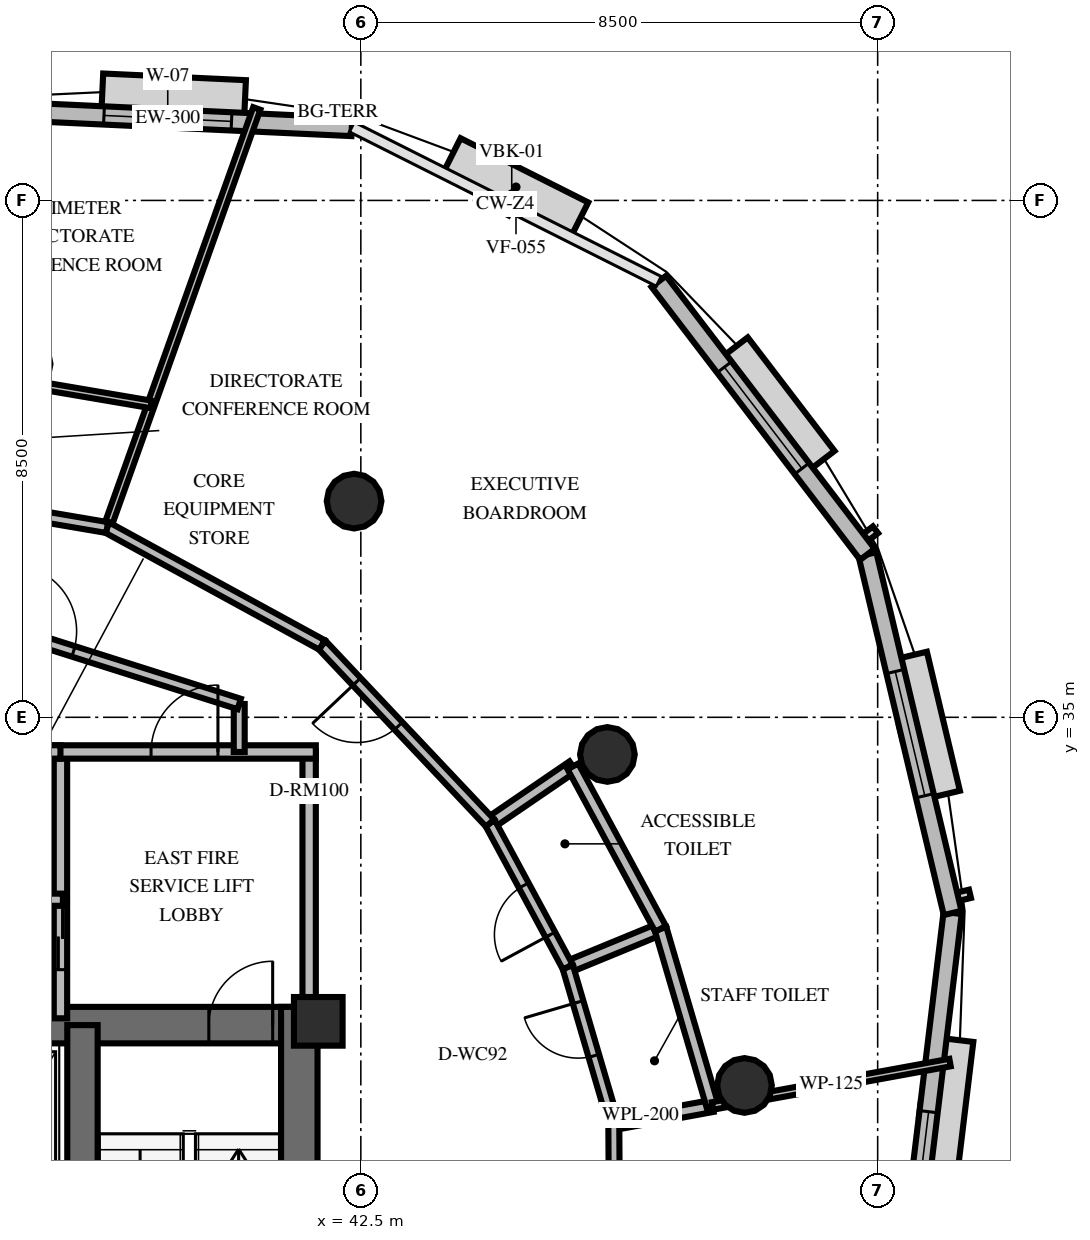
"""IFC4 building model, lengths in metres.
Left out: names, types, materials, properties, quantities, classifications, styles, units other than length and angle.
Written with IfcOpenShell. Run it as: python <this file> out.ifc"""

import sys

from ifc_helpers import new_model, si_unit, direction, frame, frame_2d, origin, origin_2d, place, context, subcontext, project, spatial, rectangle, circle, extrude, element, fill, save


model = new_model("IFC4")
c1 = context("Model", 3, precision=1e-05, world=origin(), true_north=direction((0.0, 1.0)))
c2 = subcontext(c1, "Body", "Model", "MODEL_VIEW")
j1 = project(units=[si_unit("LENGTHUNIT", "METRE"), si_unit("PLANEANGLEUNIT", "RADIAN")], contexts=[c1])
p1 = place(None, origin())
s1 = spatial("IfcSite", under=j1, at=p1, CompositionType="ELEMENT")
p2 = place(p1, origin())
s2 = spatial("IfcBuilding", under=s1, at=p2, CompositionType="ELEMENT")
p3 = place(p2, frame((0.0, 0.0, 241.2)))
s3 = spatial("IfcBuildingStorey", under=s2, at=p3, CompositionType="ELEMENT", Elevation=241.2)
p4 = place(p3, frame((26.222, 29.938, 0.0), z_axis=(0.0, 0.0, 1.0), x_axis=(1.0, 0.0, 0.0)))
e1 = element("IfcWall", 1, at=p4, inside=s3, PredefinedType="SHEAR", context=c2, shape_type="SweptSolid", body=[
    extrude(rectangle(XDim=15.566, YDim=0.6, at=frame_2d((7.783, 0.0))), origin(), (0.0, 0.0, 1.0), 3.6),
])
p5 = place(p4, frame((0.728, 0.0, 0.0)))
e2 = element("IfcOpeningElement", 2, at=p5, cuts=e1, PredefinedType="OPENING", context=c2, shape_type="SweptSolid", body=[
    extrude(rectangle(XDim=1.05, YDim=2.15, at=frame_2d((0.525, 1.075))), frame((0.0, 0.31, 0.0), z_axis=(0.0, -1.0, 0.0), x_axis=(1.0, 0.0, 0.0)), (0.0, 0.0, 1.0), 0.62),
])
p6 = place(p4, frame((13.778, 0.0, 0.0)))
e3 = element("IfcOpeningElement", 3, at=p6, cuts=e1, PredefinedType="OPENING", context=c2, shape_type="SweptSolid", body=[
    extrude(rectangle(XDim=1.05, YDim=2.15, at=frame_2d((0.525, 1.075))), frame((0.0, 0.31, 0.0), z_axis=(0.0, -1.0, 0.0), x_axis=(1.0, 0.0, 0.0)), (0.0, 0.0, 1.0), 0.62),
])
p7 = place(p4, frame((7.228, 0.0, 0.0)))
e4 = element("IfcOpeningElement", 4, at=p7, cuts=e1, PredefinedType="OPENING", context=c2, shape_type="SweptSolid", body=[
    extrude(rectangle(XDim=1.1, YDim=2.15, at=frame_2d((0.55, 1.075))), frame((0.0, 0.31, 0.0), z_axis=(0.0, -1.0, 0.0), x_axis=(1.0, 0.0, 0.0)), (0.0, 0.0, 1.0), 0.62),
])
p8 = place(p3, frame((41.488, 19.962, 0.0), z_axis=(0.0, 0.0, 1.0), x_axis=(0.0, 1.0, 0.0)))
e5 = element("IfcWall", 5, at=p8, inside=s3, PredefinedType="SHEAR", context=c2, shape_type="SweptSolid", body=[
    extrude(rectangle(XDim=10.276, YDim=0.6, at=frame_2d((5.138, 0.0))), origin(), (0.0, 0.0, 1.0), 3.6),
])
p9 = place(p3, frame((37.922, 20.262, 0.0), z_axis=(0.0, 0.0, 1.0), x_axis=(0.0, 1.0, 0.0)))
e6 = element("IfcWall", 6, at=p9, inside=s3, PredefinedType="SHEAR", context=c2, shape_type="SweptSolid", body=[
    extrude(rectangle(XDim=9.676, YDim=0.5, at=frame_2d((4.838, 0.0))), origin(), (0.0, 0.0, 1.0), 3.6),
])
p10 = place(p3, frame((41.8, 30.0, 0.0), z_axis=(0.0, 0.0, 1.0), x_axis=(1.0, 0.0, 0.0)))
e7 = element("IfcColumn", 7, at=p10, inside=s3, PredefinedType="PILASTER", context=c2, shape_type="SweptSolid", body=[
    extrude(rectangle(XDim=0.8, YDim=0.8, at=origin_2d()), origin(), (0.0, 0.0, 1.0), 3.6),
])
for number, where, z_axis, x_axis in (
    (8, (48.81, 28.946, 0.0), (0.0, 0.0, 1.0), (1.0, 0.0, 0.0)),
    (9, (46.555, 34.389, 0.0), (0.0, 0.0, 1.0), (1.0, 0.0, 0.0)),
    (10, (42.389, 38.555, 0.0), (0.0, 0.0, 1.0), (1.0, 0.0, 0.0)),
):
    element("IfcColumn", number, at=place(p3, frame(where, z_axis=z_axis, x_axis=x_axis)), inside=s3, PredefinedType="COLUMN", context=c2, shape_type="SweptSolid", body=[
        extrude(circle(Radius=0.45, at=origin_2d()), origin(), (0.0, 0.0, 1.0), 3.6),
    ])
p11 = place(p3, frame((42.352, 44.708, 0.0), z_axis=(0.0, 0.0, 1.0), x_axis=(-0.998917432733, 0.046518411209, 0.0)))
e11 = element("IfcWall", 11, at=p11, inside=s3, PredefinedType="SOLIDWALL", context=c2, shape_type="SweptSolid", body=[
    extrude(rectangle(XDim=6.062, YDim=0.3, at=frame_2d((3.031, 0.0))), origin(), (0.0, 0.0, 1.0), 2.76),
])
p12 = place(p11, frame((1.981, 0.0, 0.8)))
e12 = element("IfcOpeningElement", 12, at=p12, cuts=e11, PredefinedType="OPENING", context=c2, shape_type="SweptSolid", body=[
    extrude(rectangle(XDim=2.1, YDim=1.85, at=frame_2d((1.05, 0.925))), frame((0.0, 0.16, 0.0), z_axis=(0.0, -1.0, 0.0), x_axis=(1.0, 0.0, 0.0)), (0.0, 0.0, 1.0), 0.32),
])
p13 = place(p3, frame((51.436, 25.188, 0.0), z_axis=(0.0, 0.0, 1.0), x_axis=(0.120062472336, 0.992766338439, 0.0)))
e13 = element("IfcWall", 13, at=p13, inside=s3, PredefinedType="SOLIDWALL", context=c2, shape_type="SweptSolid", body=[
    extrude(rectangle(XDim=6.643, YDim=0.3, at=frame_2d((3.322, 0.0))), origin(), (0.0, 0.0, 1.0), 2.76),
])
p14 = place(p13, frame((1.251, 0.0, 0.8)))
e14 = element("IfcOpeningElement", 14, at=p14, cuts=e13, PredefinedType="OPENING", context=c2, shape_type="SweptSolid", body=[
    extrude(rectangle(XDim=2.1, YDim=1.85, at=frame_2d((1.05, 0.925))), frame((0.0, 0.16, 0.0), z_axis=(0.0, -1.0, 0.0), x_axis=(1.0, 0.0, 0.0)), (0.0, 0.0, 1.0), 0.32),
])
p15 = place(p3, frame((52.233, 31.783, 0.0), z_axis=(0.0, 0.0, 1.0), x_axis=(-0.23117584111, 0.972911984964, 0.0)))
e15 = element("IfcWall", 15, at=p15, inside=s3, PredefinedType="SOLIDWALL", context=c2, shape_type="SweptSolid", body=[
    extrude(rectangle(XDim=6.062, YDim=0.3, at=frame_2d((3.031, 0.0))), origin(), (0.0, 0.0, 1.0), 2.76),
])
p16 = place(p15, frame((1.981, 0.0, 0.8)))
e16 = element("IfcOpeningElement", 16, at=p16, cuts=e15, PredefinedType="OPENING", context=c2, shape_type="SweptSolid", body=[
    extrude(rectangle(XDim=2.1, YDim=1.85, at=frame_2d((1.05, 0.925))), frame((0.0, 0.16, 0.0), z_axis=(0.0, -1.0, 0.0), x_axis=(1.0, 0.0, 0.0)), (0.0, 0.0, 1.0), 0.32),
])
p17 = place(p3, frame((50.832, 37.68, 0.0), z_axis=(0.0, 0.0, 1.0), x_axis=(-0.607371519301, 0.794417923729, 0.0)))
e17 = element("IfcWall", 17, at=p17, inside=s3, PredefinedType="SOLIDWALL", context=c2, shape_type="SweptSolid", body=[
    extrude(rectangle(XDim=5.65, YDim=0.3, at=frame_2d((2.825, 0.0))), origin(), (0.0, 0.0, 1.0), 2.76),
])
p18 = place(p17, frame((1.775, 0.0, 0.8)))
e18 = element("IfcOpeningElement", 18, at=p18, cuts=e17, PredefinedType="OPENING", context=c2, shape_type="SweptSolid", body=[
    extrude(rectangle(XDim=2.1, YDim=1.85, at=frame_2d((1.05, 0.925))), frame((0.0, 0.16, 0.0), z_axis=(0.0, -1.0, 0.0), x_axis=(1.0, 0.0, 0.0)), (0.0, 0.0, 1.0), 0.32),
])
p19 = place(p3, frame((37.56, 30.05, 0.0), z_axis=(0.0, 0.0, 1.0), x_axis=(0.0, 1.0, 0.0)))
e19 = element("IfcWall", 19, at=p19, inside=s3, PredefinedType="SOLIDWALL", context=c2, shape_type="SweptSolid", body=[
    extrude(rectangle(XDim=4.38, YDim=0.22, at=frame_2d((2.19, 0.0))), origin(), (0.0, 0.0, 1.0), 2.46),
])
p20 = place(p19, frame((0.8, 0.0, 0.0)))
e20 = element("IfcOpeningElement", 20, at=p20, cuts=e19, PredefinedType="OPENING", context=c2, shape_type="SweptSolid", body=[
    extrude(rectangle(XDim=1.05, YDim=2.1, at=frame_2d((0.525, 1.05))), frame((0.0, 0.12, 0.0), z_axis=(0.0, -1.0, 0.0), x_axis=(1.0, 0.0, 0.0)), (0.0, 0.0, 1.0), 0.24),
])
p21 = place(p3, frame((41.65, 30.05, 0.0), z_axis=(0.0, 0.0, 1.0), x_axis=(0.0, 1.0, 0.0)))
e21 = element("IfcWall", 21, at=p21, inside=s3, PredefinedType="SOLIDWALL", context=c2, shape_type="SweptSolid", body=[
    extrude(rectangle(XDim=4.38, YDim=0.22, at=frame_2d((2.19, 0.0))), origin(), (0.0, 0.0, 1.0), 2.46),
])
p22 = place(p3, frame((37.45, 34.43, 0.0), z_axis=(0.0, 0.0, 1.0), x_axis=(1.0, 0.0, 0.0)))
e22 = element("IfcWall", 22, at=p22, inside=s3, PredefinedType="SOLIDWALL", context=c2, shape_type="SweptSolid", body=[
    extrude(rectangle(XDim=4.31, YDim=0.22, at=frame_2d((2.155, 0.0))), origin(), (0.0, 0.0, 1.0), 2.46),
])
p23 = place(p22, frame((1.6, 0.0, 0.0)))
e23 = element("IfcOpeningElement", 23, at=p23, cuts=e22, PredefinedType="OPENING", context=c2, shape_type="SweptSolid", body=[
    extrude(rectangle(XDim=1.1, YDim=2.15, at=frame_2d((0.55, 1.075))), frame((0.0, 0.12, 0.0), z_axis=(0.0, -1.0, 0.0), x_axis=(1.0, 0.0, 0.0)), (0.0, 0.0, 1.0), 0.24),
])
p24 = place(p3, frame((35.05, 32.0, 0.0), z_axis=(0.0, 0.0, 1.0), x_axis=(1.0, 0.0, 0.0)))
e24 = element("IfcWall", 24, at=p24, inside=s3, PredefinedType="SOLIDWALL", context=c2, shape_type="SweptSolid", body=[
    extrude(rectangle(XDim=2.55, YDim=0.2, at=frame_2d((1.275, 0.0))), origin(), (0.0, 0.0, 1.0), 2.46),
])
p25 = place(p3, frame((30.44, 34.43, 0.0), z_axis=(0.0, 0.0, 1.0), x_axis=(1.0, 0.0, 0.0)))
e25 = element("IfcWall", 25, at=p25, inside=s3, PredefinedType="SOLIDWALL", context=c2, shape_type="SweptSolid", body=[
    extrude(rectangle(XDim=7.12, YDim=0.22, at=frame_2d((3.56, 0.0))), origin(), (0.0, 0.0, 1.0), 2.46),
])
p26 = place(p25, frame((3.01, 0.0, 0.0)))
e26 = element("IfcOpeningElement", 26, at=p26, cuts=e25, PredefinedType="OPENING", context=c2, shape_type="SweptSolid", body=[
    extrude(rectangle(XDim=1.1, YDim=2.15, at=frame_2d((0.55, 1.075))), frame((0.0, 0.12, 0.0), z_axis=(0.0, -1.0, 0.0), x_axis=(1.0, 0.0, 0.0)), (0.0, 0.0, 1.0), 0.24),
])
p27 = place(p3, frame((40.5, 35.219, 0.0), z_axis=(0.0, 0.0, 1.0), x_axis=(0.0, -1.0, 0.0)))
e27 = element("IfcWall", 27, at=p27, inside=s3, PredefinedType="PARTITIONING", context=c2, shape_type="SweptSolid", body=[
    extrude(rectangle(XDim=0.789, YDim=0.18, at=frame_2d((0.395, 0.0))), origin(), (0.0, 0.0, 1.0), 2.46),
])
p28 = place(p3, frame((34.0, 37.28, 0.0), z_axis=(0.0, 0.0, 1.0), x_axis=(0.953228121756, -0.302251795518, 0.0)))
e28 = element("IfcWall", 28, at=p28, inside=s3, PredefinedType="PARTITIONING", context=c2, shape_type="SweptSolid", body=[
    extrude(rectangle(XDim=6.819, YDim=0.18, at=frame_2d((3.409, 0.0))), origin(), (0.0, 0.0, 1.0), 2.46),
])
p29 = place(p28, frame((2.86, 0.0, 0.0)))
e29 = element("IfcOpeningElement", 29, at=p29, cuts=e28, PredefinedType="OPENING", context=c2, shape_type="SweptSolid", body=[
    extrude(rectangle(XDim=1.1, YDim=2.15, at=frame_2d((0.55, 1.075))), frame((0.0, 0.1, 0.0), z_axis=(0.0, -1.0, 0.0), x_axis=(1.0, 0.0, 0.0)), (0.0, 0.0, 1.0), 0.2),
])
for number, where, z_axis, x_axis in (
    (30, (46.661, 28.312, 0.0), (0.0, 0.0, 1.0), (0.984, 0.18, 0.0)),
    (31, (45.903, 30.894, 0.0), (0.0, 0.0, 1.0), (0.925, 0.38, 0.0)),
):
    element("IfcWall", number, at=place(p3, frame(where, z_axis=z_axis, x_axis=x_axis)), inside=s3, PredefinedType="PLUMBINGWALL", context=c2, shape_type="SweptSolid", body=[
        extrude(rectangle(XDim=1.65, YDim=0.2, at=frame_2d((0.825, 0.0))), origin(), (0.0, 0.0, 1.0), 2.46),
    ])
p30 = place(p3, frame((48.284, 28.609, 0.0), z_axis=(0.0, 0.0, 1.0), x_axis=(-0.281491340898, 0.959563768073, 0.0)))
e32 = element("IfcWall", 32, at=p30, inside=s3, PredefinedType="PLUMBINGWALL", context=c2, shape_type="SweptSolid", body=[
    extrude(rectangle(XDim=3.036, YDim=0.2, at=frame_2d((1.518, 0.0))), origin(), (0.0, 0.0, 1.0), 2.46),
])
p31 = place(p3, frame((46.661, 28.312, 0.0), z_axis=(0.0, 0.0, 1.0), x_axis=(-0.281473567951, 0.95956898165, 0.0)))
e33 = element("IfcWall", 33, at=p31, inside=s3, PredefinedType="PARTITIONING", context=c2, shape_type="SweptSolid", body=[
    extrude(rectangle(XDim=2.691, YDim=0.18, at=frame_2d((1.345, 0.0))), origin(), (0.0, 0.0, 1.0), 2.46),
])
p32 = place(p31, frame((1.167, 0.0, 0.0)))
e34 = element("IfcOpeningElement", 34, at=p32, cuts=e33, PredefinedType="OPENING", context=c2, shape_type="SweptSolid", body=[
    extrude(rectangle(XDim=0.92, YDim=2.1, at=frame_2d((0.46, 1.05))), frame((0.0, 0.1, 0.0), z_axis=(0.0, -1.0, 0.0), x_axis=(1.0, 0.0, 0.0)), (0.0, 0.0, 1.0), 0.2),
])
p33 = place(p3, frame((44.625, 33.262, 0.0), z_axis=(0.0, 0.0, 1.0), x_axis=(0.825644641501, 0.564190505026, 0.0)))
e35 = element("IfcWall", 35, at=p33, inside=s3, PredefinedType="PLUMBINGWALL", context=c2, shape_type="SweptSolid", body=[
    extrude(rectangle(XDim=1.65, YDim=0.2, at=frame_2d((0.825, 0.0))), origin(), (0.0, 0.0, 1.0), 2.46),
])
p34 = place(p3, frame((47.429, 31.521, 0.0), z_axis=(0.0, 0.0, 1.0), x_axis=(-0.474857458355, 0.880062721768, 0.0)))
e36 = element("IfcWall", 36, at=p34, inside=s3, PredefinedType="PLUMBINGWALL", context=c2, shape_type="SweptSolid", body=[
    extrude(rectangle(XDim=3.035, YDim=0.2, at=frame_2d((1.518, 0.0))), origin(), (0.0, 0.0, 1.0), 2.46),
])
p35 = place(p3, frame((45.903, 30.894, 0.0), z_axis=(0.0, 0.0, 1.0), x_axis=(-0.474905831931, 0.88003661901, 0.0)))
e37 = element("IfcWall", 37, at=p35, inside=s3, PredefinedType="PARTITIONING", context=c2, shape_type="SweptSolid", body=[
    extrude(rectangle(XDim=2.691, YDim=0.18, at=frame_2d((1.345, 0.0))), origin(), (0.0, 0.0, 1.0), 2.46),
])
p36 = place(p35, frame((0.603, 0.0, 0.0)))
e38 = element("IfcOpeningElement", 38, at=p36, cuts=e37, PredefinedType="OPENING", context=c2, shape_type="SweptSolid", body=[
    extrude(rectangle(XDim=0.92, YDim=2.1, at=frame_2d((0.46, 1.05))), frame((0.0, 0.1, 0.0), z_axis=(0.0, -1.0, 0.0), x_axis=(1.0, 0.0, 0.0)), (0.0, 0.0, 1.0), 0.2),
])
p37 = place(p3, frame((48.284, 28.609, 0.0), z_axis=(0.0, 0.0, 1.0), x_axis=(0.98373190469, 0.179642811418, 0.0)))
e39 = element("IfcWall", 39, at=p37, inside=s3, PredefinedType="PARTITIONING", context=c2, shape_type="SweptSolid", body=[
    extrude(rectangle(XDim=3.971, YDim=0.125, at=frame_2d((1.986, 0.0))), origin(), (0.0, 0.0, 1.0), 2.46),
])
p38 = place(p3, frame((38.328, 38.121, 0.0), z_axis=(0.0, 0.0, 1.0), x_axis=(0.33628356157, 0.941760779719, 0.0)))
e40 = element("IfcWall", 40, at=p38, inside=s3, PredefinedType="PARTITIONING", context=c2, shape_type="SweptSolid", body=[
    extrude(rectangle(XDim=7.318, YDim=0.125, at=frame_2d((3.659, 0.0))), origin(), (0.0, 0.0, 1.0), 2.46),
])
p39 = place(p3, frame((44.625, 33.262, 0.0), z_axis=(0.0, 0.0, 1.0), x_axis=(-0.686440124719, 0.727186327688, 0.0)))
e41 = element("IfcWall", 41, at=p39, inside=s3, PredefinedType="PARTITIONING", context=c2, shape_type="SweptSolid", body=[
    extrude(rectangle(XDim=4.026, YDim=0.18, at=frame_2d((2.013, 0.0))), origin(), (0.0, 0.0, 1.0), 2.46),
])
p40 = place(p39, frame((2.195, 0.0, 0.0)))
e42 = element("IfcOpeningElement", 42, at=p40, cuts=e41, PredefinedType="OPENING", context=c2, shape_type="SweptSolid", body=[
    extrude(rectangle(XDim=1.0, YDim=2.15, at=frame_2d((0.5, 1.075))), frame((0.0, 0.1, 0.0), z_axis=(0.0, -1.0, 0.0), x_axis=(1.0, 0.0, 0.0)), (0.0, 0.0, 1.0), 0.2),
])
p41 = place(p3, frame((41.862, 36.19, 0.0), z_axis=(0.0, 0.0, 1.0), x_axis=(-0.877561700538, 0.47946372308, 0.0)))
e43 = element("IfcWall", 43, at=p41, inside=s3, PredefinedType="PARTITIONING", context=c2, shape_type="SweptSolid", body=[
    extrude(rectangle(XDim=4.027, YDim=0.18, at=frame_2d((2.013, 0.0))), origin(), (0.0, 0.0, 1.0), 2.46),
])
p42 = place(p3, frame((38.328, 38.121, 0.0), z_axis=(0.0, 0.0, 1.0), x_axis=(-0.985849799471, 0.167631061808, 0.0)))
e44 = element("IfcWall", 44, at=p42, inside=s3, PredefinedType="PARTITIONING", context=c2, shape_type="SweptSolid", body=[
    extrude(rectangle(XDim=4.47, YDim=0.18, at=frame_2d((2.235, 0.0))), origin(), (0.0, 0.0, 1.0), 2.46),
])
p43 = place(p42, frame((2.527, 0.0, 0.0)))
e45 = element("IfcOpeningElement", 45, at=p43, cuts=e44, PredefinedType="OPENING", context=c2, shape_type="SweptSolid", body=[
    extrude(rectangle(XDim=1.0, YDim=2.15, at=frame_2d((0.5, 1.075))), frame((0.0, 0.1, 0.0), z_axis=(0.0, -1.0, 0.0), x_axis=(1.0, 0.0, 0.0)), (0.0, 0.0, 1.0), 0.2),
])
p44 = place(p3, frame((39.051, 40.145, 0.0), z_axis=(0.0, 0.0, 1.0), x_axis=(-0.985847184463, 0.167646440123, 0.0)))
e46 = element("IfcWall", 46, at=p44, inside=s3, PredefinedType="PARTITIONING", context=c2, shape_type="SweptSolid", body=[
    extrude(rectangle(XDim=5.216, YDim=0.125, at=frame_2d((2.608, 0.0))), origin(), (0.0, 0.0, 1.0), 2.46),
])
p45 = place(p44, frame((3.11, 0.0, 0.0)))
e47 = element("IfcOpeningElement", 47, at=p45, cuts=e46, PredefinedType="OPENING", context=c2, shape_type="SweptSolid", body=[
    extrude(rectangle(XDim=0.95, YDim=2.15, at=frame_2d((0.475, 1.075))), frame((0.0, 0.073, 0.0), z_axis=(0.0, -1.0, 0.0), x_axis=(1.0, 0.0, 0.0)), (0.0, 0.0, 1.0), 0.145),
])
p46 = place(p3, frame((46.688, 23.843, 0.0), z_axis=(0.0, 0.0, 1.0), x_axis=(-0.006117429774, 0.999981288351, 0.0)))
e48 = element("IfcWall", 48, at=p46, inside=s3, PredefinedType="PARTITIONING", context=c2, shape_type="SweptSolid", body=[
    extrude(rectangle(XDim=4.47, YDim=0.18, at=frame_2d((2.235, 0.0))), origin(), (0.0, 0.0, 1.0), 2.46),
])
p47 = place(p46, frame((1.735, 0.0, 0.0)))
e49 = element("IfcOpeningElement", 49, at=p47, cuts=e48, PredefinedType="OPENING", context=c2, shape_type="SweptSolid", body=[
    extrude(rectangle(XDim=1.0, YDim=2.15, at=frame_2d((0.5, 1.075))), frame((0.0, 0.1, 0.0), z_axis=(0.0, -1.0, 0.0), x_axis=(1.0, 0.0, 0.0)), (0.0, 0.0, 1.0), 0.2),
])
p48 = place(p12, origin())
e50 = element("IfcWindow", 50, at=p48, inside=s3, PartitioningType="SINGLE_PANEL", PredefinedType="WINDOW", context=c2, shape_type="SweptSolid", body=[
    extrude(rectangle(XDim=2.1, YDim=1.85, at=frame_2d((1.05, 0.925))), frame((0.0, 0.03, 0.0), z_axis=(0.0, -1.0, 0.0), x_axis=(1.0, 0.0, 0.0)), (0.0, 0.0, 1.0), 0.06),
])
fill(e12, e50)
p49 = place(p14, origin())
e51 = element("IfcWindow", 51, at=p49, inside=s3, PartitioningType="SINGLE_PANEL", PredefinedType="WINDOW", context=c2, shape_type="SweptSolid", body=[
    extrude(rectangle(XDim=2.1, YDim=1.85, at=frame_2d((1.05, 0.925))), frame((0.0, 0.03, 0.0), z_axis=(0.0, -1.0, 0.0), x_axis=(1.0, 0.0, 0.0)), (0.0, 0.0, 1.0), 0.06),
])
fill(e14, e51)
p50 = place(p16, origin())
e52 = element("IfcWindow", 52, at=p50, inside=s3, PartitioningType="SINGLE_PANEL", PredefinedType="WINDOW", context=c2, shape_type="SweptSolid", body=[
    extrude(rectangle(XDim=2.1, YDim=1.85, at=frame_2d((1.05, 0.925))), frame((0.0, 0.03, 0.0), z_axis=(0.0, -1.0, 0.0), x_axis=(1.0, 0.0, 0.0)), (0.0, 0.0, 1.0), 0.06),
])
fill(e16, e52)
p51 = place(p18, origin())
e53 = element("IfcWindow", 53, at=p51, inside=s3, PartitioningType="SINGLE_PANEL", PredefinedType="WINDOW", context=c2, shape_type="SweptSolid", body=[
    extrude(rectangle(XDim=2.1, YDim=1.85, at=frame_2d((1.05, 0.925))), frame((0.0, 0.03, 0.0), z_axis=(0.0, -1.0, 0.0), x_axis=(1.0, 0.0, 0.0)), (0.0, 0.0, 1.0), 0.06),
])
fill(e18, e53)
p52 = place(p6, origin())
e54 = element("IfcDoor", 54, at=p52, inside=s3, OperationType="SINGLE_SWING_RIGHT", PredefinedType="DOOR", context=c2, shape_type="SweptSolid", body=[
    extrude(rectangle(XDim=1.05, YDim=2.15, at=frame_2d((0.525, 1.075))), frame((0.0, 0.025, 0.0), z_axis=(0.0, -1.0, 0.0), x_axis=(1.0, 0.0, 0.0)), (0.0, 0.0, 1.0), 0.05),
])
fill(e3, e54)
p53 = place(p23, origin())
e55 = element("IfcDoor", 55, at=p53, inside=s3, OperationType="SINGLE_SWING_RIGHT", PredefinedType="DOOR", context=c2, shape_type="SweptSolid", body=[
    extrude(rectangle(XDim=1.1, YDim=2.15, at=frame_2d((0.55, 1.075))), frame((0.0, 0.025, 0.0), z_axis=(0.0, -1.0, 0.0), x_axis=(1.0, 0.0, 0.0)), (0.0, 0.0, 1.0), 0.05),
])
fill(e23, e55)
p54 = place(p20, origin())
e56 = element("IfcDoor", 56, at=p54, inside=s3, OperationType="DOUBLE_DOOR_SLIDING", PredefinedType="USERDEFINED", context=c2, shape_type="SweptSolid", body=[
    extrude(rectangle(XDim=1.05, YDim=2.1, at=frame_2d((0.525, 1.05))), frame((0.0, 0.025, 0.0), z_axis=(0.0, -1.0, 0.0), x_axis=(1.0, 0.0, 0.0)), (0.0, 0.0, 1.0), 0.05),
])
fill(e20, e56)
p55 = place(p29, origin())
e57 = element("IfcDoor", 57, at=p55, inside=s3, OperationType="SINGLE_SWING_LEFT", PredefinedType="DOOR", context=c2, shape_type="SweptSolid", body=[
    extrude(rectangle(XDim=1.1, YDim=2.15, at=frame_2d((0.55, 1.075))), frame((0.0, 0.025, 0.0), z_axis=(0.0, -1.0, 0.0), x_axis=(1.0, 0.0, 0.0)), (0.0, 0.0, 1.0), 0.05),
])
fill(e29, e57)
p56 = place(p32, origin())
e58 = element("IfcDoor", 58, at=p56, inside=s3, OperationType="SINGLE_SWING_RIGHT", PredefinedType="DOOR", context=c2, shape_type="SweptSolid", body=[
    extrude(rectangle(XDim=0.92, YDim=2.1, at=frame_2d((0.46, 1.05))), frame((0.0, 0.025, 0.0), z_axis=(0.0, -1.0, 0.0), x_axis=(1.0, 0.0, 0.0)), (0.0, 0.0, 1.0), 0.05),
])
fill(e34, e58)
p57 = place(p36, origin())
e59 = element("IfcDoor", 59, at=p57, inside=s3, OperationType="SINGLE_SWING_LEFT", PredefinedType="DOOR", context=c2, shape_type="SweptSolid", body=[
    extrude(rectangle(XDim=0.92, YDim=2.1, at=frame_2d((0.46, 1.05))), frame((0.0, 0.025, 0.0), z_axis=(0.0, -1.0, 0.0), x_axis=(1.0, 0.0, 0.0)), (0.0, 0.0, 1.0), 0.05),
])
fill(e38, e59)
p58 = place(p40, origin())
e60 = element("IfcDoor", 60, at=p58, inside=s3, OperationType="SINGLE_SWING_RIGHT", PredefinedType="DOOR", context=c2, shape_type="SweptSolid", body=[
    extrude(rectangle(XDim=1.0, YDim=2.15, at=frame_2d((0.5, 1.075))), frame((0.0, 0.025, 0.0), z_axis=(0.0, -1.0, 0.0), x_axis=(1.0, 0.0, 0.0)), (0.0, 0.0, 1.0), 0.05),
])
fill(e42, e60)
save(model, sys.argv[1])
